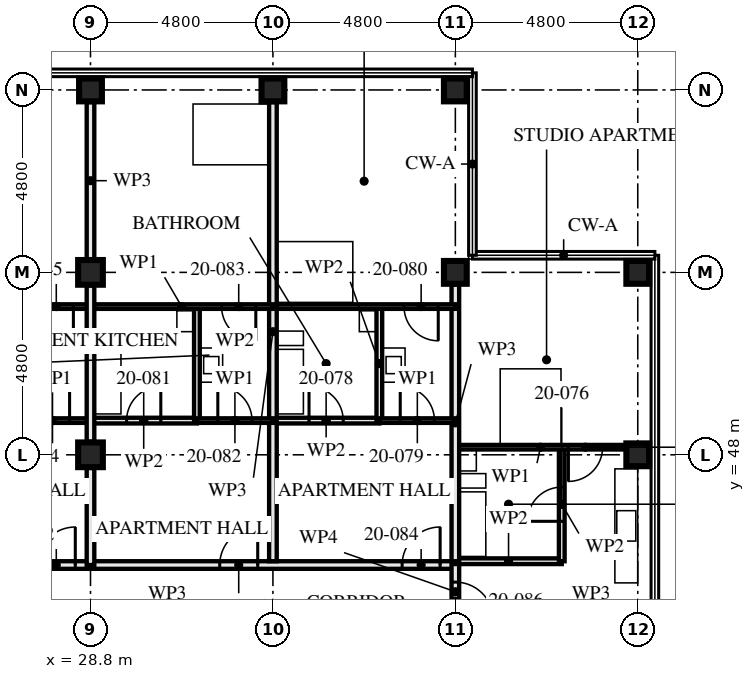
"""IFC4 building model, lengths in metres.
Left out: names, types, materials, properties, quantities, classifications, styles, units other than length and angle.
Written with IfcOpenShell. Run it as: python <this file> out.ifc"""

import sys

from ifc_helpers import new_model, si_unit, direction, frame, frame_2d, origin, origin_2d, place, context, subcontext, project, spatial, rectangle, hollow_rectangle, extrude, element, fill, save


model = new_model("IFC4")
c1 = context("Model", 3, precision=1e-05, world=origin(), true_north=direction((0.0, 1.0)))
c2 = subcontext(c1, "Body", "Model", "MODEL_VIEW")
j1 = project(units=[si_unit("LENGTHUNIT", "METRE"), si_unit("PLANEANGLEUNIT", "RADIAN")], contexts=[c1])
p1 = place(None, origin())
s1 = spatial("IfcSite", under=j1, at=p1, CompositionType="ELEMENT")
p2 = place(p1, origin())
s2 = spatial("IfcBuilding", under=s1, at=p2, CompositionType="ELEMENT")
p3 = place(p2, frame((0.0, 0.0, 76.0)))
s3 = spatial("IfcBuildingStorey", under=s2, at=p3, CompositionType="ELEMENT", Elevation=76.0)
for number, where, z_axis, x_axis in (
    (1, (28.8, 48.0, 0.0), (0.0, 0.0, 1.0), (1.0, 0.0, 0.0)),
    (2, (28.8, 52.8, 0.0), (0.0, 0.0, 1.0), (1.0, 0.0, 0.0)),
):
    element("IfcColumn", number, at=place(p3, frame(where, z_axis=z_axis, x_axis=x_axis)), inside=s3, PredefinedType="COLUMN", context=c2, shape_type="SweptSolid", body=[
        extrude(hollow_rectangle(XDim=0.65, YDim=0.65, WallThickness=0.05, at=origin_2d()), origin(), (0.0, 0.0, 1.0), 3.5),
    ])
for number, where, z_axis, x_axis in (
    (3, (28.8, 57.6, 0.0), (0.0, 0.0, 1.0), (0.0, 1.0, 0.0)),
    (4, (33.6, 57.6, 0.0), (0.0, 0.0, 1.0), (0.0, 1.0, 0.0)),
    (5, (38.4, 52.8, 0.0), (0.0, 0.0, 1.0), (0.0, 1.0, 0.0)),
    (6, (38.4, 57.6, 0.0), (0.0, 0.0, 1.0), (0.0, 1.0, 0.0)),
    (7, (43.2, 48.0, 0.0), (0.0, 0.0, 1.0), (1.0, 0.0, 0.0)),
    (8, (43.2, 52.8, 0.0), (0.0, 0.0, 1.0), (0.0, 1.0, 0.0)),
):
    element("IfcColumn", number, at=place(p3, frame(where, z_axis=z_axis, x_axis=x_axis)), inside=s3, PredefinedType="COLUMN", context=c2, shape_type="SweptSolid", body=[
        extrude(hollow_rectangle(XDim=0.6, YDim=0.6, WallThickness=0.08, at=origin_2d()), origin(), (0.0, 0.0, 1.0), 3.5),
    ])
p4 = place(p3, frame((28.8, 48.9, 0.0), z_axis=(0.0, 0.0, 1.0), x_axis=(-1.0, 0.0, 0.0)))
e9 = element("IfcWall", 9, at=p4, inside=s3, PredefinedType="PARTITIONING", context=c2, shape_type="SweptSolid", body=[
    extrude(rectangle(XDim=2.0, YDim=0.12, at=frame_2d((1.0, 0.0))), origin(), (0.0, 0.0, 1.0), 3.25),
])
p5 = place(p4, frame((0.55, 0.0, 0.0)))
e10 = element("IfcOpeningElement", 10, at=p5, cuts=e9, PredefinedType="OPENING", context=c2, shape_type="SweptSolid", body=[
    extrude(rectangle(XDim=0.9, YDim=2.1, at=frame_2d((0.45, 1.05))), frame((0.0, 0.071, 0.0), z_axis=(0.0, -1.0, 0.0), x_axis=(1.0, 0.0, 0.0)), (0.0, 0.0, 1.0), 0.141),
])
p6 = place(p3, frame((28.8, 51.9, 0.0), z_axis=(0.0, 0.0, 1.0), x_axis=(-1.0, 0.0, 0.0)))
e11 = element("IfcWall", 11, at=p6, inside=s3, PredefinedType="PARTITIONING", context=c2, shape_type="SweptSolid", body=[
    extrude(rectangle(XDim=4.8, YDim=0.12, at=frame_2d((2.4, 0.0))), origin(), (0.0, 0.0, 1.0), 3.25),
])
p7 = place(p6, frame((0.45, 0.0, 0.0)))
e12 = element("IfcOpeningElement", 12, at=p7, cuts=e11, PredefinedType="OPENING", context=c2, shape_type="SweptSolid", body=[
    extrude(rectangle(XDim=0.9, YDim=2.1, at=frame_2d((0.45, 1.05))), frame((0.0, 0.071, 0.0), z_axis=(0.0, -1.0, 0.0), x_axis=(1.0, 0.0, 0.0)), (0.0, 0.0, 1.0), 0.141),
])
p8 = place(p3, frame((28.8, 45.1, 0.0), z_axis=(0.0, 0.0, 1.0), x_axis=(-1.0, 0.0, 0.0)))
e13 = element("IfcWall", 13, at=p8, inside=s3, PredefinedType="PARTITIONING", context=c2, shape_type="SweptSolid", body=[
    extrude(rectangle(XDim=14.4, YDim=0.2, at=frame_2d((7.2, 0.0))), origin(), (0.0, 0.0, 1.0), 3.25),
])
p9 = place(p8, frame((0.4, 0.0, 0.0)))
e14 = element("IfcOpeningElement", 14, at=p9, cuts=e13, PredefinedType="OPENING", context=c2, shape_type="SweptSolid", body=[
    extrude(rectangle(XDim=1.0, YDim=2.1, at=frame_2d((0.5, 1.05))), frame((0.0, 0.111, 0.0), z_axis=(0.0, -1.0, 0.0), x_axis=(1.0, 0.0, 0.0)), (0.0, 0.0, 1.0), 0.221),
])
p10 = place(p8, frame((5.2, 0.0, 0.0)))
e15 = element("IfcOpeningElement", 15, at=p10, cuts=e13, PredefinedType="OPENING", context=c2, shape_type="SweptSolid", body=[
    extrude(rectangle(XDim=1.0, YDim=2.1, at=frame_2d((0.5, 1.05))), frame((0.0, 0.111, 0.0), z_axis=(0.0, -1.0, 0.0), x_axis=(1.0, 0.0, 0.0)), (0.0, 0.0, 1.0), 0.221),
])
p11 = place(p8, frame((10.0, 0.0, 0.0)))
e16 = element("IfcOpeningElement", 16, at=p11, cuts=e13, PredefinedType="OPENING", context=c2, shape_type="SweptSolid", body=[
    extrude(rectangle(XDim=1.0, YDim=2.1, at=frame_2d((0.5, 1.05))), frame((0.0, 0.111, 0.0), z_axis=(0.0, -1.0, 0.0), x_axis=(1.0, 0.0, 0.0)), (0.0, 0.0, 1.0), 0.221),
])
p12 = place(p3, frame((41.2, 48.2, 0.0), z_axis=(0.0, 0.0, 1.0), x_axis=(0.0, -1.0, 0.0)))
e17 = element("IfcWall", 17, at=p12, inside=s3, PredefinedType="PARTITIONING", context=c2, shape_type="SweptSolid", body=[
    extrude(rectangle(XDim=3.0, YDim=0.15, at=frame_2d((1.5, 0.0))), origin(), (0.0, 0.0, 1.0), 2.04),
])
p13 = place(p12, frame((1.05, 0.0, 0.0)))
e18 = element("IfcOpeningElement", 18, at=p13, cuts=e17, PredefinedType="OPENING", context=c2, shape_type="SweptSolid", body=[
    extrude(rectangle(XDim=0.9, YDim=2.0, at=frame_2d((0.45, 1.0))), frame((0.0, 0.085, 0.0), z_axis=(0.0, -1.0, 0.0), x_axis=(1.0, 0.0, 0.0)), (0.0, 0.0, 1.0), 0.171),
])
p14 = place(p3, frame((41.2, 45.2, 0.0), z_axis=(0.0, 0.0, 1.0), x_axis=(-1.0, 0.0, 0.0)))
e19 = element("IfcWall", 19, at=p14, inside=s3, PredefinedType="PARTITIONING", context=c2, shape_type="SweptSolid", body=[
    extrude(rectangle(XDim=2.8, YDim=0.15, at=frame_2d((1.4, 0.0))), origin(), (0.0, 0.0, 1.0), 3.25),
])
p15 = place(p3, frame((42.88, 48.2, 0.0), z_axis=(0.0, 0.0, 1.0), x_axis=(-1.0, 0.0, 0.0)))
e20 = element("IfcWall", 20, at=p15, inside=s3, PredefinedType="PARTITIONING", context=c2, shape_type="SweptSolid", body=[
    extrude(rectangle(XDim=4.48, YDim=0.12, at=frame_2d((2.24, 0.0))), origin(), (0.0, 0.0, 1.0), 2.04),
])
p16 = place(p15, frame((0.605, 0.0, 0.0)))
e21 = element("IfcOpeningElement", 21, at=p16, cuts=e20, PredefinedType="OPENING", context=c2, shape_type="SweptSolid", body=[
    extrude(rectangle(XDim=0.9, YDim=2.0, at=frame_2d((0.45, 1.0))), frame((0.0, 0.071, 0.0), z_axis=(0.0, -1.0, 0.0), x_axis=(1.0, 0.0, 0.0)), (0.0, 0.0, 1.0), 0.141),
])
p17 = place(p3, frame((38.4, 52.48, 0.0), z_axis=(0.0, 0.0, 1.0), x_axis=(0.0, -1.0, 0.0)))
e22 = element("IfcWall", 22, at=p17, inside=s3, PredefinedType="PARTITIONING", context=c2, shape_type="SweptSolid", body=[
    extrude(rectangle(XDim=7.28, YDim=0.2, at=frame_2d((3.64, 0.0))), origin(), (0.0, 0.0, 1.0), 2.04),
])
p18 = place(p3, frame((36.4, 51.9, 0.0), z_axis=(0.0, 0.0, 1.0), x_axis=(0.0, -1.0, 0.0)))
e23 = element("IfcWall", 23, at=p18, inside=s3, PredefinedType="PARTITIONING", context=c2, shape_type="SweptSolid", body=[
    extrude(rectangle(XDim=3.0, YDim=0.15, at=frame_2d((1.5, 0.0))), origin(), (0.0, 0.0, 1.0), 3.25),
])
p19 = place(p3, frame((36.4, 48.9, 0.0), z_axis=(0.0, 0.0, 1.0), x_axis=(-1.0, 0.0, 0.0)))
e24 = element("IfcWall", 24, at=p19, inside=s3, PredefinedType="PARTITIONING", context=c2, shape_type="SweptSolid", body=[
    extrude(rectangle(XDim=2.8, YDim=0.15, at=frame_2d((1.4, 0.0))), origin(), (0.0, 0.0, 1.0), 3.25),
])
p20 = place(p19, frame((0.95, 0.0, 0.0)))
e25 = element("IfcOpeningElement", 25, at=p20, cuts=e24, PredefinedType="OPENING", context=c2, shape_type="SweptSolid", body=[
    extrude(rectangle(XDim=0.9, YDim=2.1, at=frame_2d((0.45, 1.05))), frame((0.0, 0.085, 0.0), z_axis=(0.0, -1.0, 0.0), x_axis=(1.0, 0.0, 0.0)), (0.0, 0.0, 1.0), 0.171),
])
p21 = place(p3, frame((38.4, 48.9, 0.0), z_axis=(0.0, 0.0, 1.0), x_axis=(-1.0, 0.0, 0.0)))
e26 = element("IfcWall", 26, at=p21, inside=s3, PredefinedType="PARTITIONING", context=c2, shape_type="SweptSolid", body=[
    extrude(rectangle(XDim=2.0, YDim=0.12, at=frame_2d((1.0, 0.0))), origin(), (0.0, 0.0, 1.0), 3.25),
])
p22 = place(p21, frame((0.55, 0.0, 0.0)))
e27 = element("IfcOpeningElement", 27, at=p22, cuts=e26, PredefinedType="OPENING", context=c2, shape_type="SweptSolid", body=[
    extrude(rectangle(XDim=0.9, YDim=2.1, at=frame_2d((0.45, 1.05))), frame((0.0, 0.071, 0.0), z_axis=(0.0, -1.0, 0.0), x_axis=(1.0, 0.0, 0.0)), (0.0, 0.0, 1.0), 0.141),
])
p23 = place(p3, frame((38.4, 51.9, 0.0), z_axis=(0.0, 0.0, 1.0), x_axis=(-1.0, 0.0, 0.0)))
e28 = element("IfcWall", 28, at=p23, inside=s3, PredefinedType="PARTITIONING", context=c2, shape_type="SweptSolid", body=[
    extrude(rectangle(XDim=4.8, YDim=0.12, at=frame_2d((2.4, 0.0))), origin(), (0.0, 0.0, 1.0), 3.25),
])
p24 = place(p23, frame((0.45, 0.0, 0.0)))
e29 = element("IfcOpeningElement", 29, at=p24, cuts=e28, PredefinedType="OPENING", context=c2, shape_type="SweptSolid", body=[
    extrude(rectangle(XDim=0.9, YDim=2.1, at=frame_2d((0.45, 1.05))), frame((0.0, 0.071, 0.0), z_axis=(0.0, -1.0, 0.0), x_axis=(1.0, 0.0, 0.0)), (0.0, 0.0, 1.0), 0.141),
])
p25 = place(p3, frame((33.6, 57.28, 0.0), z_axis=(0.0, 0.0, 1.0), x_axis=(0.0, -1.0, 0.0)))
e30 = element("IfcWall", 30, at=p25, inside=s3, PredefinedType="PARTITIONING", context=c2, shape_type="SweptSolid", body=[
    extrude(rectangle(XDim=12.08, YDim=0.2, at=frame_2d((6.04, 0.0))), origin(), (0.0, 0.0, 1.0), 2.04),
])
p26 = place(p3, frame((31.6, 51.9, 0.0), z_axis=(0.0, 0.0, 1.0), x_axis=(0.0, -1.0, 0.0)))
e31 = element("IfcWall", 31, at=p26, inside=s3, PredefinedType="PARTITIONING", context=c2, shape_type="SweptSolid", body=[
    extrude(rectangle(XDim=3.0, YDim=0.15, at=frame_2d((1.5, 0.0))), origin(), (0.0, 0.0, 1.0), 3.25),
])
p27 = place(p3, frame((31.6, 48.9, 0.0), z_axis=(0.0, 0.0, 1.0), x_axis=(-1.0, 0.0, 0.0)))
e32 = element("IfcWall", 32, at=p27, inside=s3, PredefinedType="PARTITIONING", context=c2, shape_type="SweptSolid", body=[
    extrude(rectangle(XDim=2.8, YDim=0.15, at=frame_2d((1.4, 0.0))), origin(), (0.0, 0.0, 1.0), 3.25),
])
p28 = place(p27, frame((0.95, 0.0, 0.0)))
e33 = element("IfcOpeningElement", 33, at=p28, cuts=e32, PredefinedType="OPENING", context=c2, shape_type="SweptSolid", body=[
    extrude(rectangle(XDim=0.9, YDim=2.1, at=frame_2d((0.45, 1.05))), frame((0.0, 0.085, 0.0), z_axis=(0.0, -1.0, 0.0), x_axis=(1.0, 0.0, 0.0)), (0.0, 0.0, 1.0), 0.171),
])
p29 = place(p3, frame((33.6, 48.9, 0.0), z_axis=(0.0, 0.0, 1.0), x_axis=(-1.0, 0.0, 0.0)))
e34 = element("IfcWall", 34, at=p29, inside=s3, PredefinedType="PARTITIONING", context=c2, shape_type="SweptSolid", body=[
    extrude(rectangle(XDim=2.0, YDim=0.12, at=frame_2d((1.0, 0.0))), origin(), (0.0, 0.0, 1.0), 3.25),
])
p30 = place(p29, frame((0.55, 0.0, 0.0)))
e35 = element("IfcOpeningElement", 35, at=p30, cuts=e34, PredefinedType="OPENING", context=c2, shape_type="SweptSolid", body=[
    extrude(rectangle(XDim=0.9, YDim=2.1, at=frame_2d((0.45, 1.05))), frame((0.0, 0.071, 0.0), z_axis=(0.0, -1.0, 0.0), x_axis=(1.0, 0.0, 0.0)), (0.0, 0.0, 1.0), 0.141),
])
p31 = place(p3, frame((33.6, 51.9, 0.0), z_axis=(0.0, 0.0, 1.0), x_axis=(-1.0, 0.0, 0.0)))
e36 = element("IfcWall", 36, at=p31, inside=s3, PredefinedType="PARTITIONING", context=c2, shape_type="SweptSolid", body=[
    extrude(rectangle(XDim=4.8, YDim=0.12, at=frame_2d((2.4, 0.0))), origin(), (0.0, 0.0, 1.0), 3.25),
])
p32 = place(p31, frame((0.45, 0.0, 0.0)))
e37 = element("IfcOpeningElement", 37, at=p32, cuts=e36, PredefinedType="OPENING", context=c2, shape_type="SweptSolid", body=[
    extrude(rectangle(XDim=0.9, YDim=2.1, at=frame_2d((0.45, 1.05))), frame((0.0, 0.071, 0.0), z_axis=(0.0, -1.0, 0.0), x_axis=(1.0, 0.0, 0.0)), (0.0, 0.0, 1.0), 0.141),
])
p33 = place(p3, frame((38.4, 45.1, 0.0), z_axis=(0.0, 0.0, 1.0), x_axis=(-1.0, 0.0, 0.0)))
e38 = element("IfcWall", 38, at=p33, inside=s3, PredefinedType="PARTITIONING", context=c2, shape_type="SweptSolid", body=[
    extrude(rectangle(XDim=9.6, YDim=0.2, at=frame_2d((4.8, 0.0))), origin(), (0.0, 0.0, 1.0), 3.25),
])
p34 = place(p33, frame((0.4, 0.0, 0.0)))
e39 = element("IfcOpeningElement", 39, at=p34, cuts=e38, PredefinedType="OPENING", context=c2, shape_type="SweptSolid", body=[
    extrude(rectangle(XDim=1.0, YDim=2.1, at=frame_2d((0.5, 1.05))), frame((0.0, 0.111, 0.0), z_axis=(0.0, -1.0, 0.0), x_axis=(1.0, 0.0, 0.0)), (0.0, 0.0, 1.0), 0.221),
])
p35 = place(p33, frame((5.2, 0.0, 0.0)))
e40 = element("IfcOpeningElement", 40, at=p35, cuts=e38, PredefinedType="OPENING", context=c2, shape_type="SweptSolid", body=[
    extrude(rectangle(XDim=1.0, YDim=2.1, at=frame_2d((0.5, 1.05))), frame((0.0, 0.111, 0.0), z_axis=(0.0, -1.0, 0.0), x_axis=(1.0, 0.0, 0.0)), (0.0, 0.0, 1.0), 0.221),
])
p36 = place(p3, frame((38.4, 45.2, 0.0), z_axis=(0.0, 0.0, 1.0), x_axis=(0.0, -1.0, 0.0)))
e41 = element("IfcWall", 41, at=p36, inside=s3, PredefinedType="PARTITIONING", context=c2, shape_type="SweptSolid", body=[
    extrude(rectangle(XDim=1.605, YDim=0.2, at=frame_2d((0.802, 0.0))), origin(), (0.0, 0.0, 1.0), 3.25),
])
p37 = place(p36, frame((0.55, 0.0, 0.0)))
e42 = element("IfcOpeningElement", 42, at=p37, cuts=e41, PredefinedType="OPENING", context=c2, shape_type="SweptSolid", body=[
    extrude(rectangle(XDim=1.0, YDim=2.1, at=frame_2d((0.5, 1.05))), frame((0.0, 0.111, 0.0), z_axis=(0.0, -1.0, 0.0), x_axis=(1.0, 0.0, 0.0)), (0.0, 0.0, 1.0), 0.221),
])
p38 = place(p3, frame((28.8, 45.1, 0.0), z_axis=(0.0, 0.0, 1.0), x_axis=(0.0, 1.0, 0.0)))
e43 = element("IfcWall", 43, at=p38, inside=s3, PredefinedType="PARTITIONING", context=c2, shape_type="SweptSolid", body=[
    extrude(rectangle(XDim=2.555, YDim=0.2, at=frame_2d((1.277, 0.0))), origin(), (0.0, 0.0, 1.0), 2.04),
])
p39 = place(p3, frame((28.8, 48.345, 0.0), z_axis=(0.0, 0.0, 1.0), x_axis=(0.0, 1.0, 0.0)))
e44 = element("IfcWall", 44, at=p39, inside=s3, PredefinedType="PARTITIONING", context=c2, shape_type="SweptSolid", body=[
    extrude(rectangle(XDim=4.11, YDim=0.2, at=frame_2d((2.055, 0.0))), origin(), (0.0, 0.0, 1.0), 2.04),
])
p40 = place(p3, frame((28.8, 53.145, 0.0), z_axis=(0.0, 0.0, 1.0), x_axis=(0.0, 1.0, 0.0)))
e45 = element("IfcWall", 45, at=p40, inside=s3, PredefinedType="PARTITIONING", context=c2, shape_type="SweptSolid", body=[
    extrude(rectangle(XDim=4.135, YDim=0.2, at=frame_2d((2.067, 0.0))), origin(), (0.0, 0.0, 1.0), 2.04),
])
p41 = place(p5, frame((0.9, 0.0, 0.0), z_axis=(0.0, 0.0, 1.0), x_axis=(-1.0, 0.0, 0.0)))
e46 = element("IfcDoor", 46, at=p41, inside=s3, OperationType="SINGLE_SWING_LEFT", PredefinedType="DOOR", context=c2, shape_type="SweptSolid", body=[
    extrude(rectangle(XDim=0.9, YDim=2.1, at=frame_2d((0.45, 1.05))), frame((0.0, 0.022, 0.0), z_axis=(0.0, -1.0, 0.0), x_axis=(1.0, 0.0, 0.0)), (0.0, 0.0, 1.0), 0.044),
])
fill(e10, e46)
p42 = place(p7, origin())
e47 = element("IfcDoor", 47, at=p42, inside=s3, OperationType="SINGLE_SWING_RIGHT", PredefinedType="DOOR", context=c2, shape_type="SweptSolid", body=[
    extrude(rectangle(XDim=0.9, YDim=2.1, at=frame_2d((0.45, 1.05))), frame((0.0, 0.022, 0.0), z_axis=(0.0, -1.0, 0.0), x_axis=(1.0, 0.0, 0.0)), (0.0, 0.0, 1.0), 0.044),
])
fill(e12, e47)
p43 = place(p9, frame((1.0, 0.0, 0.0), z_axis=(0.0, 0.0, 1.0), x_axis=(-1.0, 0.0, 0.0)))
e48 = element("IfcDoor", 48, at=p43, inside=s3, OperationType="SINGLE_SWING_LEFT", PredefinedType="DOOR", context=c2, shape_type="SweptSolid", body=[
    extrude(rectangle(XDim=1.0, YDim=2.1, at=frame_2d((0.5, 1.05))), frame((0.0, 0.027, 0.0), z_axis=(0.0, -1.0, 0.0), x_axis=(1.0, 0.0, 0.0)), (0.0, 0.0, 1.0), 0.054),
])
fill(e14, e48)
p44 = place(p13, frame((0.9, 0.0, 0.0), z_axis=(0.0, 0.0, 1.0), x_axis=(-1.0, 0.0, 0.0)))
e49 = element("IfcDoor", 49, at=p44, inside=s3, OperationType="SINGLE_SWING_RIGHT", PredefinedType="DOOR", context=c2, shape_type="SweptSolid", body=[
    extrude(rectangle(XDim=0.9, YDim=2.0, at=frame_2d((0.45, 1.0))), frame((0.0, 0.022, 0.0), z_axis=(0.0, -1.0, 0.0), x_axis=(1.0, 0.0, 0.0)), (0.0, 0.0, 1.0), 0.044),
])
fill(e18, e49)
p45 = place(p16, origin())
e50 = element("IfcDoor", 50, at=p45, inside=s3, OperationType="SINGLE_SWING_LEFT", PredefinedType="DOOR", context=c2, shape_type="SweptSolid", body=[
    extrude(rectangle(XDim=0.9, YDim=2.0, at=frame_2d((0.45, 1.0))), frame((0.0, 0.022, 0.0), z_axis=(0.0, -1.0, 0.0), x_axis=(1.0, 0.0, 0.0)), (0.0, 0.0, 1.0), 0.044),
])
fill(e21, e50)
p46 = place(p20, frame((0.9, 0.0, 0.0), z_axis=(0.0, 0.0, 1.0), x_axis=(-1.0, 0.0, 0.0)))
e51 = element("IfcDoor", 51, at=p46, inside=s3, OperationType="SINGLE_SWING_RIGHT", PredefinedType="DOOR", context=c2, shape_type="SweptSolid", body=[
    extrude(rectangle(XDim=0.9, YDim=2.1, at=frame_2d((0.45, 1.05))), frame((0.0, 0.022, 0.0), z_axis=(0.0, -1.0, 0.0), x_axis=(1.0, 0.0, 0.0)), (0.0, 0.0, 1.0), 0.044),
])
fill(e25, e51)
p47 = place(p22, frame((0.9, 0.0, 0.0), z_axis=(0.0, 0.0, 1.0), x_axis=(-1.0, 0.0, 0.0)))
e52 = element("IfcDoor", 52, at=p47, inside=s3, OperationType="SINGLE_SWING_RIGHT", PredefinedType="DOOR", context=c2, shape_type="SweptSolid", body=[
    extrude(rectangle(XDim=0.9, YDim=2.1, at=frame_2d((0.45, 1.05))), frame((0.0, 0.022, 0.0), z_axis=(0.0, -1.0, 0.0), x_axis=(1.0, 0.0, 0.0)), (0.0, 0.0, 1.0), 0.044),
])
fill(e27, e52)
p48 = place(p24, origin())
e53 = element("IfcDoor", 53, at=p48, inside=s3, OperationType="SINGLE_SWING_RIGHT", PredefinedType="DOOR", context=c2, shape_type="SweptSolid", body=[
    extrude(rectangle(XDim=0.9, YDim=2.1, at=frame_2d((0.45, 1.05))), frame((0.0, 0.022, 0.0), z_axis=(0.0, -1.0, 0.0), x_axis=(1.0, 0.0, 0.0)), (0.0, 0.0, 1.0), 0.044),
])
fill(e29, e53)
p49 = place(p28, frame((0.9, 0.0, 0.0), z_axis=(0.0, 0.0, 1.0), x_axis=(-1.0, 0.0, 0.0)))
e54 = element("IfcDoor", 54, at=p49, inside=s3, OperationType="SINGLE_SWING_LEFT", PredefinedType="DOOR", context=c2, shape_type="SweptSolid", body=[
    extrude(rectangle(XDim=0.9, YDim=2.1, at=frame_2d((0.45, 1.05))), frame((0.0, 0.022, 0.0), z_axis=(0.0, -1.0, 0.0), x_axis=(1.0, 0.0, 0.0)), (0.0, 0.0, 1.0), 0.044),
])
fill(e33, e54)
p50 = place(p30, frame((0.9, 0.0, 0.0), z_axis=(0.0, 0.0, 1.0), x_axis=(-1.0, 0.0, 0.0)))
e55 = element("IfcDoor", 55, at=p50, inside=s3, OperationType="SINGLE_SWING_RIGHT", PredefinedType="DOOR", context=c2, shape_type="SweptSolid", body=[
    extrude(rectangle(XDim=0.9, YDim=2.1, at=frame_2d((0.45, 1.05))), frame((0.0, 0.022, 0.0), z_axis=(0.0, -1.0, 0.0), x_axis=(1.0, 0.0, 0.0)), (0.0, 0.0, 1.0), 0.044),
])
fill(e35, e55)
p51 = place(p32, origin())
e56 = element("IfcDoor", 56, at=p51, inside=s3, OperationType="SINGLE_SWING_RIGHT", PredefinedType="DOOR", context=c2, shape_type="SweptSolid", body=[
    extrude(rectangle(XDim=0.9, YDim=2.1, at=frame_2d((0.45, 1.05))), frame((0.0, 0.022, 0.0), z_axis=(0.0, -1.0, 0.0), x_axis=(1.0, 0.0, 0.0)), (0.0, 0.0, 1.0), 0.044),
])
fill(e37, e56)
p52 = place(p34, frame((1.0, 0.0, 0.0), z_axis=(0.0, 0.0, 1.0), x_axis=(-1.0, 0.0, 0.0)))
e57 = element("IfcDoor", 57, at=p52, inside=s3, OperationType="SINGLE_SWING_LEFT", PredefinedType="DOOR", context=c2, shape_type="SweptSolid", body=[
    extrude(rectangle(XDim=1.0, YDim=2.1, at=frame_2d((0.5, 1.05))), frame((0.0, 0.027, 0.0), z_axis=(0.0, -1.0, 0.0), x_axis=(1.0, 0.0, 0.0)), (0.0, 0.0, 1.0), 0.054),
])
fill(e39, e57)
p53 = place(p35, frame((1.0, 0.0, 0.0), z_axis=(0.0, 0.0, 1.0), x_axis=(-1.0, 0.0, 0.0)))
e58 = element("IfcDoor", 58, at=p53, inside=s3, OperationType="SINGLE_SWING_LEFT", PredefinedType="DOOR", context=c2, shape_type="SweptSolid", body=[
    extrude(rectangle(XDim=1.0, YDim=2.1, at=frame_2d((0.5, 1.05))), frame((0.0, 0.027, 0.0), z_axis=(0.0, -1.0, 0.0), x_axis=(1.0, 0.0, 0.0)), (0.0, 0.0, 1.0), 0.054),
])
fill(e40, e58)
p54 = place(p37, origin())
e59 = element("IfcDoor", 59, at=p54, inside=s3, OperationType="SINGLE_SWING_LEFT", PredefinedType="DOOR", context=c2, shape_type="SweptSolid", body=[
    extrude(rectangle(XDim=1.0, YDim=2.1, at=frame_2d((0.5, 1.05))), frame((0.0, 0.027, 0.0), z_axis=(0.0, -1.0, 0.0), x_axis=(1.0, 0.0, 0.0)), (0.0, 0.0, 1.0), 0.054),
])
fill(e42, e59)
save(model, sys.argv[1])
